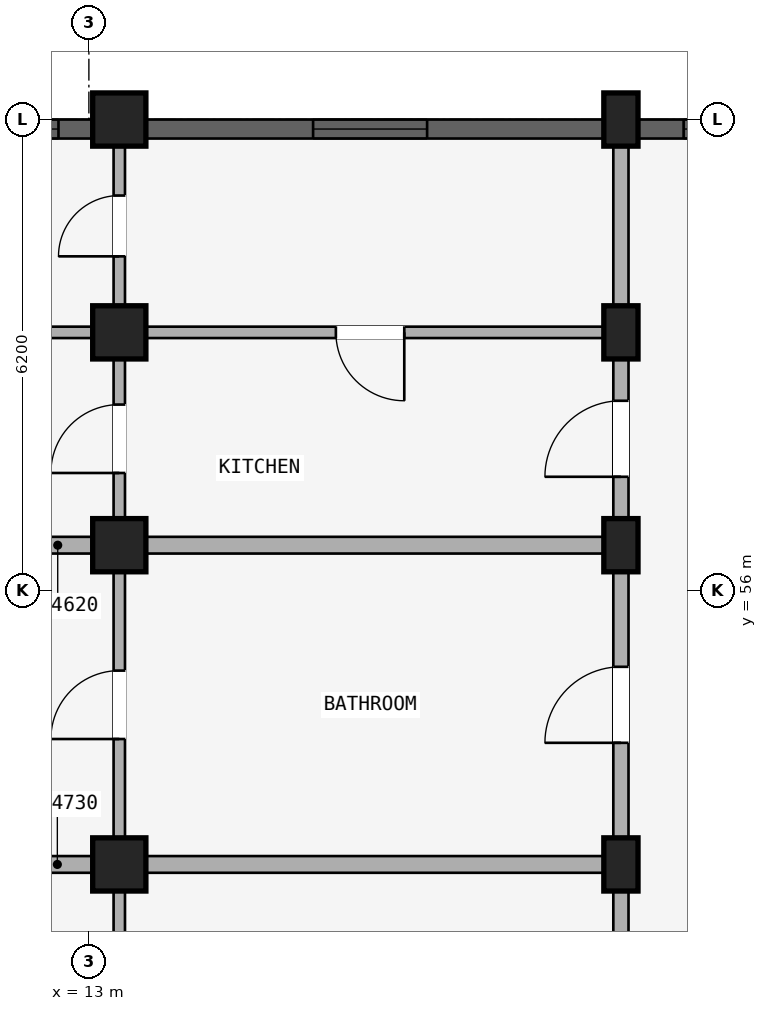
"""IFC4 building model, lengths in metres.
Left out: names, types, materials, properties, quantities, classifications, styles, units other than length and angle.
Written with IfcOpenShell. Run it as: python <this file> out.ifc"""

import sys

from ifc_helpers import new_model, si_unit, direction, frame, frame_2d, origin, origin_2d, place, context, subcontext, project, spatial, rectangle, extrude, element, fill, save


model = new_model("IFC4")
c1 = context("Model", 3, precision=1e-05, world=origin(), true_north=direction((0.0, 1.0)))
c2 = subcontext(c1, "Body", "Model", "MODEL_VIEW")
j1 = project(units=[si_unit("LENGTHUNIT", "METRE"), si_unit("PLANEANGLEUNIT", "RADIAN")], contexts=[c1])
p1 = place(None, origin())
s1 = spatial("IfcSite", under=j1, at=p1, CompositionType="ELEMENT")
p2 = place(p1, origin())
s2 = spatial("IfcBuilding", under=s1, at=p2, CompositionType="ELEMENT")
p3 = place(p2, frame((0.0, 0.0, 21.3)))
s3 = spatial("IfcBuildingStorey", under=s2, at=p3, CompositionType="ELEMENT", Elevation=21.3)
p4 = place(p3, frame((20.0, 52.4, 0.0), z_axis=(0.0, 0.0, 1.0), x_axis=(1.0, 0.0, 0.0)))
e1 = element("IfcColumn", 1, at=p4, inside=s3, PredefinedType="COLUMN", context=c2, shape_type="SweptSolid", body=[
    extrude(rectangle(XDim=0.45, YDim=0.7, at=origin_2d()), origin(), (0.0, 0.0, 1.0), 2.93),
])
p5 = place(p3, frame((13.4, 52.4, 0.0), z_axis=(0.0, 0.0, 1.0), x_axis=(1.0, 0.0, 0.0)))
e2 = element("IfcColumn", 2, at=p5, inside=s3, PredefinedType="COLUMN", context=c2, shape_type="SweptSolid", body=[
    extrude(rectangle(XDim=0.7, YDim=0.7, at=origin_2d()), origin(), (0.0, 0.0, 1.0), 2.93),
])
p6 = place(p3, frame((20.0, 56.6, 0.0), z_axis=(0.0, 0.0, 1.0), x_axis=(1.0, 0.0, 0.0)))
e3 = element("IfcColumn", 3, at=p6, inside=s3, PredefinedType="COLUMN", context=c2, shape_type="SweptSolid", body=[
    extrude(rectangle(XDim=0.45, YDim=0.7, at=origin_2d()), origin(), (0.0, 0.0, 1.0), 2.93),
])
p7 = place(p3, frame((13.4, 56.6, 0.0), z_axis=(0.0, 0.0, 1.0), x_axis=(1.0, 0.0, 0.0)))
e4 = element("IfcColumn", 4, at=p7, inside=s3, PredefinedType="COLUMN", context=c2, shape_type="SweptSolid", body=[
    extrude(rectangle(XDim=0.7, YDim=0.7, at=origin_2d()), origin(), (0.0, 0.0, 1.0), 2.93),
])
p8 = place(p3, frame((20.0, 59.4, 0.0), z_axis=(0.0, 0.0, 1.0), x_axis=(1.0, 0.0, 0.0)))
e5 = element("IfcColumn", 5, at=p8, inside=s3, PredefinedType="COLUMN", context=c2, shape_type="SweptSolid", body=[
    extrude(rectangle(XDim=0.45, YDim=0.7, at=origin_2d()), origin(), (0.0, 0.0, 1.0), 2.93),
])
p9 = place(p3, frame((13.4, 59.4, 0.0), z_axis=(0.0, 0.0, 1.0), x_axis=(1.0, 0.0, 0.0)))
e6 = element("IfcColumn", 6, at=p9, inside=s3, PredefinedType="COLUMN", context=c2, shape_type="SweptSolid", body=[
    extrude(rectangle(XDim=0.7, YDim=0.7, at=origin_2d()), origin(), (0.0, 0.0, 1.0), 2.93),
])
p10 = place(p3, frame((20.0, 62.2, 0.0), z_axis=(0.0, 0.0, 1.0), x_axis=(1.0, 0.0, 0.0)))
e7 = element("IfcColumn", 7, at=p10, inside=s3, PredefinedType="COLUMN", context=c2, shape_type="SweptSolid", body=[
    extrude(rectangle(XDim=0.45, YDim=0.7, at=origin_2d()), origin(), (0.0, 0.0, 1.0), 2.93),
])
p11 = place(p3, frame((13.4, 62.2, 0.0), z_axis=(0.0, 0.0, 1.0), x_axis=(1.0, 0.0, 0.0)))
e8 = element("IfcColumn", 8, at=p11, inside=s3, PredefinedType="COLUMN", context=c2, shape_type="SweptSolid", body=[
    extrude(rectangle(XDim=0.7, YDim=0.7, at=origin_2d()), origin(), (0.0, 0.0, 1.0), 2.93),
])
p12 = place(p3, frame((20.0, 48.35, 0.0), z_axis=(0.0, 0.0, 1.0), x_axis=(0.0, 1.0, 0.0)))
e9 = element("IfcWall", 9, at=p12, inside=s3, PredefinedType="STANDARD", context=c2, shape_type="SweptSolid", body=[
    extrude(rectangle(XDim=4.05, YDim=0.2, at=frame_2d((2.025, 0.0))), origin(), (0.0, 0.0, 1.0), 2.372),
])
p13 = place(p12, frame((1.525, 0.0, 0.0)))
e10 = element("IfcOpeningElement", 10, at=p13, cuts=e9, PredefinedType="OPENING", context=c2, shape_type="SweptSolid", body=[
    extrude(rectangle(XDim=1.0, YDim=2.15, at=frame_2d((0.5, 1.075))), frame((0.0, 0.11, 0.0), z_axis=(0.0, -1.0, 0.0), x_axis=(1.0, 0.0, 0.0)), (0.0, 0.0, 1.0), 0.22),
])
p14 = place(p3, frame((13.4, 48.43, 0.0), z_axis=(0.0, 0.0, 1.0), x_axis=(0.0, 1.0, 0.0)))
e11 = element("IfcWall", 11, at=p14, inside=s3, PredefinedType="PARTITIONING", context=c2, shape_type="SweptSolid", body=[
    extrude(rectangle(XDim=3.89, YDim=0.15, at=frame_2d((1.945, 0.0))), origin(), (0.0, 0.0, 1.0), 2.372),
])
p15 = place(p14, frame((1.495, 0.0, 0.0)))
e12 = element("IfcOpeningElement", 12, at=p15, cuts=e11, PredefinedType="OPENING", context=c2, shape_type="SweptSolid", body=[
    extrude(rectangle(XDim=0.9, YDim=2.1, at=frame_2d((0.45, 1.05))), frame((0.0, 0.085, 0.0), z_axis=(0.0, -1.0, 0.0), x_axis=(1.0, 0.0, 0.0)), (0.0, 0.0, 1.0), 0.17),
])
p16 = place(p3, frame((20.0, 52.4, 0.0), z_axis=(0.0, 0.0, 1.0), x_axis=(0.0, 1.0, 0.0)))
e13 = element("IfcWall", 13, at=p16, inside=s3, PredefinedType="STANDARD", context=c2, shape_type="SweptSolid", body=[
    extrude(rectangle(XDim=4.2, YDim=0.2, at=frame_2d((2.1, 0.0))), origin(), (0.0, 0.0, 1.0), 2.372),
])
p17 = place(p16, frame((1.6, 0.0, 0.0)))
e14 = element("IfcOpeningElement", 14, at=p17, cuts=e13, PredefinedType="OPENING", context=c2, shape_type="SweptSolid", body=[
    extrude(rectangle(XDim=1.0, YDim=2.15, at=frame_2d((0.5, 1.075))), frame((0.0, 0.11, 0.0), z_axis=(0.0, -1.0, 0.0), x_axis=(1.0, 0.0, 0.0)), (0.0, 0.0, 1.0), 0.22),
])
p18 = place(p3, frame((13.4, 52.48, 0.0), z_axis=(0.0, 0.0, 1.0), x_axis=(0.0, 1.0, 0.0)))
e15 = element("IfcWall", 15, at=p18, inside=s3, PredefinedType="PARTITIONING", context=c2, shape_type="SweptSolid", body=[
    extrude(rectangle(XDim=4.04, YDim=0.15, at=frame_2d((2.02, 0.0))), origin(), (0.0, 0.0, 1.0), 2.372),
])
p19 = place(p18, frame((1.57, 0.0, 0.0)))
e16 = element("IfcOpeningElement", 16, at=p19, cuts=e15, PredefinedType="OPENING", context=c2, shape_type="SweptSolid", body=[
    extrude(rectangle(XDim=0.9, YDim=2.1, at=frame_2d((0.45, 1.05))), frame((0.0, 0.085, 0.0), z_axis=(0.0, -1.0, 0.0), x_axis=(1.0, 0.0, 0.0)), (0.0, 0.0, 1.0), 0.17),
])
p20 = place(p3, frame((19.95, 52.4, 0.0), z_axis=(0.0, 0.0, 1.0), x_axis=(-1.0, 0.0, 0.0)))
e17 = element("IfcWall", 17, at=p20, inside=s3, PredefinedType="STANDARD", context=c2, shape_type="SweptSolid", body=[
    extrude(rectangle(XDim=14.73, YDim=0.22, at=frame_2d((7.365, 0.0))), origin(), (0.0, 0.0, 1.0), 2.372),
])
p21 = place(p3, frame((20.0, 56.6, 0.0), z_axis=(0.0, 0.0, 1.0), x_axis=(0.0, 1.0, 0.0)))
e18 = element("IfcWall", 18, at=p21, inside=s3, PredefinedType="STANDARD", context=c2, shape_type="SweptSolid", body=[
    extrude(rectangle(XDim=2.8, YDim=0.2, at=frame_2d((1.4, 0.0))), origin(), (0.0, 0.0, 1.0), 2.372),
])
p22 = place(p21, frame((0.9, 0.0, 0.0)))
e19 = element("IfcOpeningElement", 19, at=p22, cuts=e18, PredefinedType="OPENING", context=c2, shape_type="SweptSolid", body=[
    extrude(rectangle(XDim=1.0, YDim=2.15, at=frame_2d((0.5, 1.075))), frame((0.0, 0.11, 0.0), z_axis=(0.0, -1.0, 0.0), x_axis=(1.0, 0.0, 0.0)), (0.0, 0.0, 1.0), 0.22),
])
p23 = place(p3, frame((13.4, 56.68, 0.0), z_axis=(0.0, 0.0, 1.0), x_axis=(0.0, 1.0, 0.0)))
e20 = element("IfcWall", 20, at=p23, inside=s3, PredefinedType="PLUMBINGWALL", context=c2, shape_type="SweptSolid", body=[
    extrude(rectangle(XDim=2.64, YDim=0.15, at=frame_2d((1.32, 0.0))), origin(), (0.0, 0.0, 1.0), 2.372),
])
p24 = place(p23, frame((0.87, 0.0, 0.0)))
e21 = element("IfcOpeningElement", 21, at=p24, cuts=e20, PredefinedType="OPENING", context=c2, shape_type="SweptSolid", body=[
    extrude(rectangle(XDim=0.9, YDim=2.1, at=frame_2d((0.45, 1.05))), frame((0.0, 0.085, 0.0), z_axis=(0.0, -1.0, 0.0), x_axis=(1.0, 0.0, 0.0)), (0.0, 0.0, 1.0), 0.17),
])
p25 = place(p3, frame((19.9, 56.6, 0.0), z_axis=(0.0, 0.0, 1.0), x_axis=(-1.0, 0.0, 0.0)))
e22 = element("IfcWall", 22, at=p25, inside=s3, PredefinedType="STANDARD", context=c2, shape_type="SweptSolid", body=[
    extrude(rectangle(XDim=14.62, YDim=0.22, at=frame_2d((7.31, 0.0))), origin(), (0.0, 0.0, 1.0), 2.372),
])
p26 = place(p3, frame((20.0, 59.4, 0.0), z_axis=(0.0, 0.0, 1.0), x_axis=(0.0, 1.0, 0.0)))
e23 = element("IfcWall", 23, at=p26, inside=s3, PredefinedType="STANDARD", context=c2, shape_type="SweptSolid", body=[
    extrude(rectangle(XDim=2.8, YDim=0.2, at=frame_2d((1.4, 0.0))), origin(), (0.0, 0.0, 1.0), 2.372),
])
p27 = place(p3, frame((13.4, 59.48, 0.0), z_axis=(0.0, 0.0, 1.0), x_axis=(0.0, 1.0, 0.0)))
e24 = element("IfcWall", 24, at=p27, inside=s3, PredefinedType="PLUMBINGWALL", context=c2, shape_type="SweptSolid", body=[
    extrude(rectangle(XDim=2.64, YDim=0.15, at=frame_2d((1.32, 0.0))), origin(), (0.0, 0.0, 1.0), 2.372),
])
p28 = place(p27, frame((0.92, 0.0, 0.0)))
e25 = element("IfcOpeningElement", 25, at=p28, cuts=e24, PredefinedType="OPENING", context=c2, shape_type="SweptSolid", body=[
    extrude(rectangle(XDim=0.8, YDim=2.1, at=frame_2d((0.4, 1.05))), frame((0.0, 0.085, 0.0), z_axis=(0.0, -1.0, 0.0), x_axis=(1.0, 0.0, 0.0)), (0.0, 0.0, 1.0), 0.17),
])
p29 = place(p3, frame((19.9, 59.4, 0.0), z_axis=(0.0, 0.0, 1.0), x_axis=(-1.0, 0.0, 0.0)))
e26 = element("IfcWall", 26, at=p29, inside=s3, PredefinedType="PARTITIONING", context=c2, shape_type="SweptSolid", body=[
    extrude(rectangle(XDim=14.62, YDim=0.15, at=frame_2d((7.31, 0.0))), origin(), (0.0, 0.0, 1.0), 2.372),
])
p30 = place(p29, frame((2.75, 0.0, 0.0)))
e27 = element("IfcOpeningElement", 27, at=p30, cuts=e26, PredefinedType="OPENING", context=c2, shape_type="SweptSolid", body=[
    extrude(rectangle(XDim=0.9, YDim=2.1, at=frame_2d((0.45, 1.05))), frame((0.0, 0.085, 0.0), z_axis=(0.0, -1.0, 0.0), x_axis=(1.0, 0.0, 0.0)), (0.0, 0.0, 1.0), 0.17),
])
p31 = place(p3, frame((22.171, 62.075, 0.0), z_axis=(0.0, 0.0, 1.0), x_axis=(-1.0, 0.0, 0.0)))
e28 = element("IfcWall", 28, at=p31, inside=s3, PredefinedType="STANDARD", context=c2, shape_type="SweptSolid", body=[
    extrude(rectangle(XDim=1.943, YDim=0.25, at=frame_2d((0.971, 0.0))), origin(), (0.0, 0.0, 1.0), 2.372),
])
p32 = place(p31, frame((0.596, 0.0, 0.88)))
e29 = element("IfcOpeningElement", 29, at=p32, cuts=e28, PredefinedType="OPENING", context=c2, shape_type="SweptSolid", body=[
    extrude(rectangle(XDim=0.75, YDim=1.05, at=frame_2d((0.375, 0.525))), frame((0.0, 0.135, 0.0), z_axis=(0.0, -1.0, 0.0), x_axis=(1.0, 0.0, 0.0)), (0.0, 0.0, 1.0), 0.27),
])
p33 = place(p3, frame((19.771, 62.075, 0.0), z_axis=(0.0, 0.0, 1.0), x_axis=(-1.0, 0.0, 0.0)))
e30 = element("IfcWall", 30, at=p33, inside=s3, PredefinedType="STANDARD", context=c2, shape_type="SweptSolid", body=[
    extrude(rectangle(XDim=6.018, YDim=0.25, at=frame_2d((3.009, 0.0))), origin(), (0.0, 0.0, 1.0), 2.372),
])
p34 = place(p33, frame((2.322, 0.0, 0.522)))
e31 = element("IfcOpeningElement", 31, at=p34, cuts=e30, PredefinedType="OPENING", context=c2, shape_type="SweptSolid", body=[
    extrude(rectangle(XDim=1.5, YDim=1.65, at=frame_2d((0.75, 0.825))), frame((0.0, 0.135, 0.0), z_axis=(0.0, -1.0, 0.0), x_axis=(1.0, 0.0, 0.0)), (0.0, 0.0, 1.0), 0.27),
])
p35 = place(p3, frame((13.046, 62.075, 0.0), z_axis=(0.0, 0.0, 1.0), x_axis=(-1.0, 0.0, 0.0)))
e32 = element("IfcWall", 32, at=p35, inside=s3, PredefinedType="STANDARD", context=c2, shape_type="SweptSolid", body=[
    extrude(rectangle(XDim=2.093, YDim=0.25, at=frame_2d((1.046, 0.0))), origin(), (0.0, 0.0, 1.0), 2.372),
])
p36 = place(p35, frame((0.447, 0.0, 0.672)))
e33 = element("IfcOpeningElement", 33, at=p36, cuts=e32, PredefinedType="OPENING", context=c2, shape_type="SweptSolid", body=[
    extrude(rectangle(XDim=1.2, YDim=1.5, at=frame_2d((0.6, 0.75))), frame((0.0, 0.135, 0.0), z_axis=(0.0, -1.0, 0.0), x_axis=(1.0, 0.0, 0.0)), (0.0, 0.0, 1.0), 0.27),
])
p37 = place(p32, origin())
e34 = element("IfcWindow", 34, at=p37, inside=s3, PartitioningType="SINGLE_PANEL", PredefinedType="WINDOW", context=c2, shape_type="SweptSolid", body=[
    extrude(rectangle(XDim=0.75, YDim=1.05, at=frame_2d((0.375, 0.525))), frame((0.0, 0.03, 0.0), z_axis=(0.0, -1.0, 0.0), x_axis=(1.0, 0.0, 0.0)), (0.0, 0.0, 1.0), 0.06),
])
fill(e29, e34)
p38 = place(p34, origin())
e35 = element("IfcWindow", 35, at=p38, inside=s3, PartitioningType="DOUBLE_PANEL_VERTICAL", PredefinedType="WINDOW", context=c2, shape_type="SweptSolid", body=[
    extrude(rectangle(XDim=1.5, YDim=1.65, at=frame_2d((0.75, 0.825))), frame((0.0, 0.03, 0.0), z_axis=(0.0, -1.0, 0.0), x_axis=(1.0, 0.0, 0.0)), (0.0, 0.0, 1.0), 0.06),
])
fill(e31, e35)
p39 = place(p36, origin())
e36 = element("IfcWindow", 36, at=p39, inside=s3, PartitioningType="SINGLE_PANEL", PredefinedType="WINDOW", context=c2, shape_type="SweptSolid", body=[
    extrude(rectangle(XDim=1.2, YDim=1.5, at=frame_2d((0.6, 0.75))), frame((0.0, 0.03, 0.0), z_axis=(0.0, -1.0, 0.0), x_axis=(1.0, 0.0, 0.0)), (0.0, 0.0, 1.0), 0.06),
])
fill(e33, e36)
p40 = place(p17, frame((1.0, 0.0, 0.0), z_axis=(0.0, 0.0, 1.0), x_axis=(-1.0, 0.0, 0.0)))
e37 = element("IfcDoor", 37, at=p40, inside=s3, OperationType="SINGLE_SWING_RIGHT", PredefinedType="DOOR", context=c2, shape_type="SweptSolid", body=[
    extrude(rectangle(XDim=1.0, YDim=2.15, at=frame_2d((0.5, 1.075))), frame((0.0, 0.025, 0.0), z_axis=(0.0, -1.0, 0.0), x_axis=(1.0, 0.0, 0.0)), (0.0, 0.0, 1.0), 0.05),
])
fill(e14, e37)
p41 = place(p19, origin())
e38 = element("IfcDoor", 38, at=p41, inside=s3, OperationType="SINGLE_SWING_LEFT", PredefinedType="DOOR", context=c2, shape_type="SweptSolid", body=[
    extrude(rectangle(XDim=0.9, YDim=2.1, at=frame_2d((0.45, 1.05))), frame((0.0, 0.025, 0.0), z_axis=(0.0, -1.0, 0.0), x_axis=(1.0, 0.0, 0.0)), (0.0, 0.0, 1.0), 0.05),
])
fill(e16, e38)
p42 = place(p24, origin())
e39 = element("IfcDoor", 39, at=p42, inside=s3, OperationType="SINGLE_SWING_LEFT", PredefinedType="DOOR", context=c2, shape_type="SweptSolid", body=[
    extrude(rectangle(XDim=0.9, YDim=2.1, at=frame_2d((0.45, 1.05))), frame((0.0, 0.025, 0.0), z_axis=(0.0, -1.0, 0.0), x_axis=(1.0, 0.0, 0.0)), (0.0, 0.0, 1.0), 0.05),
])
fill(e21, e39)
p43 = place(p22, frame((1.0, 0.0, 0.0), z_axis=(0.0, 0.0, 1.0), x_axis=(-1.0, 0.0, 0.0)))
e40 = element("IfcDoor", 40, at=p43, inside=s3, OperationType="SINGLE_SWING_RIGHT", PredefinedType="DOOR", context=c2, shape_type="SweptSolid", body=[
    extrude(rectangle(XDim=1.0, YDim=2.15, at=frame_2d((0.5, 1.075))), frame((0.0, 0.025, 0.0), z_axis=(0.0, -1.0, 0.0), x_axis=(1.0, 0.0, 0.0)), (0.0, 0.0, 1.0), 0.05),
])
fill(e19, e40)
p44 = place(p28, origin())
e41 = element("IfcDoor", 41, at=p44, inside=s3, OperationType="SINGLE_SWING_LEFT", PredefinedType="DOOR", context=c2, shape_type="SweptSolid", body=[
    extrude(rectangle(XDim=0.8, YDim=2.1, at=frame_2d((0.4, 1.05))), frame((0.0, 0.025, 0.0), z_axis=(0.0, -1.0, 0.0), x_axis=(1.0, 0.0, 0.0)), (0.0, 0.0, 1.0), 0.05),
])
fill(e25, e41)
p45 = place(p30, origin())
e42 = element("IfcDoor", 42, at=p45, inside=s3, OperationType="SINGLE_SWING_LEFT", PredefinedType="DOOR", context=c2, shape_type="SweptSolid", body=[
    extrude(rectangle(XDim=0.9, YDim=2.1, at=frame_2d((0.45, 1.05))), frame((0.0, 0.025, 0.0), z_axis=(0.0, -1.0, 0.0), x_axis=(1.0, 0.0, 0.0)), (0.0, 0.0, 1.0), 0.05),
])
fill(e27, e42)
save(model, sys.argv[1])
